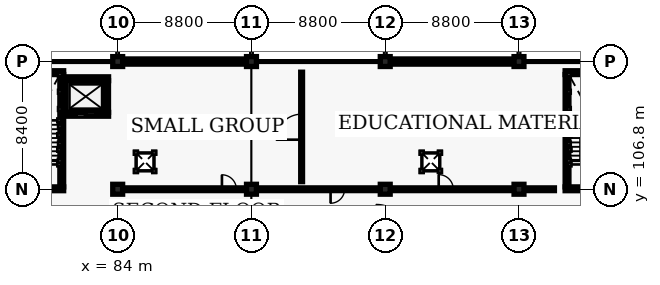
"""IFC4 building model, lengths in metres.
Left out: names, types, materials, properties, quantities, classifications, styles, units other than length and angle.
Written with IfcOpenShell. Run it as: python <this file> out.ifc"""

import sys

from ifc_helpers import new_model, si_unit, direction, frame, frame_2d, origin, origin_2d, place, context, subcontext, project, spatial, rectangle, extrude, element, fill, save


model = new_model("IFC4")
c1 = context("Model", 3, precision=1e-05, world=origin(), true_north=direction((0.0, 1.0)))
c2 = subcontext(c1, "Body", "Model", "MODEL_VIEW")
j1 = project(units=[si_unit("LENGTHUNIT", "METRE"), si_unit("PLANEANGLEUNIT", "RADIAN")], contexts=[c1])
p1 = place(None, origin())
s1 = spatial("IfcSite", under=j1, at=p1, CompositionType="ELEMENT")
p2 = place(p1, origin())
s2 = spatial("IfcBuilding", under=s1, at=p2, CompositionType="ELEMENT")
p3 = place(p2, frame((0.0, 0.0, 9.0)))
s3 = spatial("IfcBuildingStorey", under=s2, at=p3, CompositionType="ELEMENT", Elevation=9.0)
for number, where, z_axis, x_axis in (
    (1, (84.0, 106.8, 0.0), (0.0, 0.0, 1.0), (1.0, 0.0, 0.0)),
    (2, (84.0, 115.2, 0.0), (0.0, 0.0, 1.0), (1.0, 0.0, 0.0)),
    (3, (92.8, 106.8, 0.0), (0.0, 0.0, 1.0), (1.0, 0.0, 0.0)),
    (4, (92.8, 115.2, 0.0), (0.0, 0.0, 1.0), (1.0, 0.0, 0.0)),
    (5, (101.6, 106.8, 0.0), (0.0, 0.0, 1.0), (1.0, 0.0, 0.0)),
    (6, (101.6, 115.2, 0.0), (0.0, 0.0, 1.0), (1.0, 0.0, 0.0)),
    (7, (110.4, 106.8, 0.0), (0.0, 0.0, 1.0), (1.0, 0.0, 0.0)),
    (8, (110.4, 115.2, 0.0), (0.0, 0.0, 1.0), (1.0, 0.0, 0.0)),
):
    element("IfcColumn", number, at=place(p3, frame(where, z_axis=z_axis, x_axis=x_axis)), inside=s3, PredefinedType="COLUMN", context=c2, shape_type="SweptSolid", body=[
        extrude(rectangle(XDim=0.65, YDim=0.65, at=origin_2d()), origin(), (0.0, 0.0, 1.0), 3.9),
    ])
p4 = place(p3, frame((84.1, 115.2, 0.0), z_axis=(0.0, 0.0, 1.0), x_axis=(1.0, 0.0, 0.0)))
e9 = element("IfcWall", 9, at=p4, inside=s3, PredefinedType="SOLIDWALL", context=c2, shape_type="SweptSolid", body=[
    extrude(rectangle(XDim=8.6, YDim=0.34, at=frame_2d((4.3, 0.0))), origin(), (0.0, 0.0, 1.0), 2.845),
])
p5 = place(p3, frame((101.7, 115.2, 0.0), z_axis=(0.0, 0.0, 1.0), x_axis=(1.0, 0.0, 0.0)))
e10 = element("IfcWall", 10, at=p5, inside=s3, PredefinedType="SOLIDWALL", context=c2, shape_type="SweptSolid", body=[
    extrude(rectangle(XDim=8.6, YDim=0.34, at=frame_2d((4.3, 0.0))), origin(), (0.0, 0.0, 1.0), 2.845),
])
p6 = place(p3, frame((80.445, 106.83, 0.0), z_axis=(0.0, 0.0, 1.0), x_axis=(-1.0, 0.0, 0.0)))
e11 = element("IfcWall", 11, at=p6, inside=s3, PredefinedType="SHEAR", context=c2, shape_type="SweptSolid", body=[
    extrude(rectangle(XDim=3.61, YDim=0.25, at=frame_2d((1.805, 0.0))), origin(), (0.0, 0.0, 1.0), 3.66),
])
p7 = place(p6, frame((1.235, 0.0, 0.0)))
e12 = element("IfcOpeningElement", 12, at=p7, cuts=e11, PredefinedType="OPENING", context=c2, shape_type="SweptSolid", body=[
    extrude(rectangle(XDim=1.14, YDim=2.15, at=frame_2d((0.57, 1.075))), frame((0.0, 0.135, 0.0), z_axis=(0.0, -1.0, 0.0), x_axis=(1.0, 0.0, 0.0)), (0.0, 0.0, 1.0), 0.27),
])
p8 = place(p3, frame((76.835, 114.47, 0.0), z_axis=(0.0, 0.0, 1.0), x_axis=(1.0, 0.0, 0.0)))
e13 = element("IfcWall", 13, at=p8, inside=s3, PredefinedType="SHEAR", context=c2, shape_type="SweptSolid", body=[
    extrude(rectangle(XDim=3.61, YDim=0.25, at=frame_2d((1.805, 0.0))), origin(), (0.0, 0.0, 1.0), 3.66),
])
p9 = place(p3, frame((80.32, 114.345, 0.0), z_axis=(0.0, 0.0, 1.0), x_axis=(0.0, -1.0, 0.0)))
e14 = element("IfcWall", 14, at=p9, inside=s3, PredefinedType="SHEAR", context=c2, shape_type="SweptSolid", body=[
    extrude(rectangle(XDim=7.39, YDim=0.25, at=frame_2d((3.695, 0.0))), origin(), (0.0, 0.0, 1.0), 3.66),
])
p10 = place(p3, frame((80.4, 111.73, 0.0), z_axis=(0.0, 0.0, 1.0), x_axis=(1.0, 0.0, 0.0)))
e15 = element("IfcWall", 15, at=p10, inside=s3, PredefinedType="SHEAR", context=c2, shape_type="SweptSolid", body=[
    extrude(rectangle(XDim=3.0, YDim=0.25, at=frame_2d((1.5, 0.0))), origin(), (0.0, 0.0, 1.0), 3.66),
])
p11 = place(p10, frame((0.89, 0.0, 0.0)))
e16 = element("IfcOpeningElement", 16, at=p11, cuts=e15, PredefinedType="OPENING", context=c2, shape_type="SweptSolid", body=[
    extrude(rectangle(XDim=1.22, YDim=2.18, at=frame_2d((0.61, 1.09))), frame((0.0, 0.135, 0.0), z_axis=(0.0, -1.0, 0.0), x_axis=(1.0, 0.0, 0.0)), (0.0, 0.0, 1.0), 0.27),
])
p12 = place(p3, frame((83.4, 114.07, 0.0), z_axis=(0.0, 0.0, 1.0), x_axis=(-1.0, 0.0, 0.0)))
e17 = element("IfcWall", 17, at=p12, inside=s3, PredefinedType="SHEAR", context=c2, shape_type="SweptSolid", body=[
    extrude(rectangle(XDim=3.0, YDim=0.25, at=frame_2d((1.5, 0.0))), origin(), (0.0, 0.0, 1.0), 3.66),
])
p13 = place(p3, frame((83.27, 111.86, 0.0), z_axis=(0.0, 0.0, 1.0), x_axis=(0.0, 1.0, 0.0)))
e18 = element("IfcWall", 18, at=p13, inside=s3, PredefinedType="SHEAR", context=c2, shape_type="SweptSolid", body=[
    extrude(rectangle(XDim=2.08, YDim=0.25, at=frame_2d((1.04, 0.0))), origin(), (0.0, 0.0, 1.0), 3.66),
])
p14 = place(p3, frame((117.045, 106.83, 0.0), z_axis=(0.0, 0.0, 1.0), x_axis=(-1.0, 0.0, 0.0)))
e19 = element("IfcWall", 19, at=p14, inside=s3, PredefinedType="SHEAR", context=c2, shape_type="SweptSolid", body=[
    extrude(rectangle(XDim=3.61, YDim=0.25, at=frame_2d((1.805, 0.0))), origin(), (0.0, 0.0, 1.0), 3.66),
])
p15 = place(p14, frame((1.205, 0.0, 0.0)))
e20 = element("IfcOpeningElement", 20, at=p15, cuts=e19, PredefinedType="OPENING", context=c2, shape_type="SweptSolid", body=[
    extrude(rectangle(XDim=1.2, YDim=2.15, at=frame_2d((0.6, 1.075))), frame((0.0, 0.135, 0.0), z_axis=(0.0, -1.0, 0.0), x_axis=(1.0, 0.0, 0.0)), (0.0, 0.0, 1.0), 0.27),
])
p16 = place(p3, frame((113.435, 114.47, 0.0), z_axis=(0.0, 0.0, 1.0), x_axis=(1.0, 0.0, 0.0)))
e21 = element("IfcWall", 21, at=p16, inside=s3, PredefinedType="SHEAR", context=c2, shape_type="SweptSolid", body=[
    extrude(rectangle(XDim=3.61, YDim=0.25, at=frame_2d((1.805, 0.0))), origin(), (0.0, 0.0, 1.0), 3.66),
])
p17 = place(p3, frame((113.56, 106.955, 0.0), z_axis=(0.0, 0.0, 1.0), x_axis=(0.0, 1.0, 0.0)))
e22 = element("IfcWall", 22, at=p17, inside=s3, PredefinedType="SHEAR", context=c2, shape_type="SweptSolid", body=[
    extrude(rectangle(XDim=7.39, YDim=0.25, at=frame_2d((3.695, 0.0))), origin(), (0.0, 0.0, 1.0), 3.66),
])
p18 = place(p3, frame((84.2, 106.8, 0.0), z_axis=(0.0, 0.0, 1.0), x_axis=(1.0, 0.0, 0.0)))
e23 = element("IfcWall", 23, at=p18, inside=s3, PredefinedType="PARTITIONING", context=c2, shape_type="SweptSolid", body=[
    extrude(rectangle(XDim=28.53, YDim=0.18, at=frame_2d((14.265, 0.0))), origin(), (0.0, 0.0, 1.0), 2.845),
])
p19 = place(p18, frame((6.658, 0.0, 0.0)))
e24 = element("IfcOpeningElement", 24, at=p19, cuts=e23, PredefinedType="OPENING", context=c2, shape_type="SweptSolid", body=[
    extrude(rectangle(XDim=0.95, YDim=2.12, at=frame_2d((0.475, 1.06))), frame((0.0, 0.1, 0.0), z_axis=(0.0, -1.0, 0.0), x_axis=(1.0, 0.0, 0.0)), (0.0, 0.0, 1.0), 0.2),
])
p20 = place(p18, frame((13.805, 0.0, 0.0)))
e25 = element("IfcOpeningElement", 25, at=p20, cuts=e23, PredefinedType="OPENING", context=c2, shape_type="SweptSolid", body=[
    extrude(rectangle(XDim=0.92, YDim=2.1, at=frame_2d((0.46, 1.05))), frame((0.0, 0.1, 0.0), z_axis=(0.0, -1.0, 0.0), x_axis=(1.0, 0.0, 0.0)), (0.0, 0.0, 1.0), 0.2),
])
p21 = place(p18, frame((20.917, 0.0, 0.0)))
e26 = element("IfcOpeningElement", 26, at=p21, cuts=e23, PredefinedType="OPENING", context=c2, shape_type="SweptSolid", body=[
    extrude(rectangle(XDim=0.96, YDim=2.08, at=frame_2d((0.48, 1.04))), frame((0.0, 0.1, 0.0), z_axis=(0.0, -1.0, 0.0), x_axis=(1.0, 0.0, 0.0)), (0.0, 0.0, 1.0), 0.2),
])
p22 = place(p3, frame((96.1, 107.3, 0.0), z_axis=(0.0, 0.0, 1.0), x_axis=(0.0, 1.0, 0.0)))
e27 = element("IfcWall", 27, at=p22, inside=s3, PredefinedType="PARTITIONING", context=c2, shape_type="SweptSolid", body=[
    extrude(rectangle(XDim=7.2, YDim=0.12, at=frame_2d((3.6, 0.0))), origin(), (0.0, 0.0, 1.0), 3.645),
])
p23 = place(p22, frame((2.76, 0.0, 0.0)))
e28 = element("IfcOpeningElement", 28, at=p23, cuts=e27, PredefinedType="OPENING", context=c2, shape_type="SweptSolid", body=[
    extrude(rectangle(XDim=1.68, YDim=2.26, at=frame_2d((0.84, 1.13))), frame((0.0, 0.07, 0.0), z_axis=(0.0, -1.0, 0.0), x_axis=(1.0, 0.0, 0.0)), (0.0, 0.0, 1.0), 0.14),
])
p24 = place(p11, origin())
e29 = element("IfcDoor", 29, at=p24, inside=s3, OperationType="SLIDING_TO_RIGHT", PredefinedType="DOOR", context=c2, shape_type="SweptSolid", body=[
    extrude(rectangle(XDim=1.22, YDim=2.18, at=frame_2d((0.61, 1.09))), frame((0.0, 0.025, 0.0), z_axis=(0.0, -1.0, 0.0), x_axis=(1.0, 0.0, 0.0)), (0.0, 0.0, 1.0), 0.05),
])
fill(e16, e29)
p25 = place(p19, origin())
e30 = element("IfcDoor", 30, at=p25, inside=s3, OperationType="SINGLE_SWING_LEFT", PredefinedType="DOOR", context=c2, shape_type="SweptSolid", body=[
    extrude(rectangle(XDim=0.95, YDim=2.12, at=frame_2d((0.475, 1.06))), frame((0.0, 0.025, 0.0), z_axis=(0.0, -1.0, 0.0), x_axis=(1.0, 0.0, 0.0)), (0.0, 0.0, 1.0), 0.05),
])
fill(e24, e30)
p26 = place(p20, origin())
e31 = element("IfcDoor", 31, at=p26, inside=s3, OperationType="SINGLE_SWING_RIGHT", PredefinedType="DOOR", context=c2, shape_type="SweptSolid", body=[
    extrude(rectangle(XDim=0.92, YDim=2.1, at=frame_2d((0.46, 1.05))), frame((0.0, 0.025, 0.0), z_axis=(0.0, -1.0, 0.0), x_axis=(1.0, 0.0, 0.0)), (0.0, 0.0, 1.0), 0.05),
])
fill(e25, e31)
p27 = place(p21, origin())
e32 = element("IfcDoor", 32, at=p27, inside=s3, OperationType="SINGLE_SWING_LEFT", PredefinedType="DOOR", context=c2, shape_type="SweptSolid", body=[
    extrude(rectangle(XDim=0.96, YDim=2.08, at=frame_2d((0.48, 1.04))), frame((0.0, 0.025, 0.0), z_axis=(0.0, -1.0, 0.0), x_axis=(1.0, 0.0, 0.0)), (0.0, 0.0, 1.0), 0.05),
])
fill(e26, e32)
p28 = place(p23, origin())
e33 = element("IfcDoor", 33, at=p28, inside=s3, OperationType="DOUBLE_DOOR_SINGLE_SWING", PredefinedType="DOOR", context=c2, shape_type="SweptSolid", body=[
    extrude(rectangle(XDim=1.68, YDim=2.26, at=frame_2d((0.84, 1.13))), frame((0.0, 0.025, 0.0), z_axis=(0.0, -1.0, 0.0), x_axis=(1.0, 0.0, 0.0)), (0.0, 0.0, 1.0), 0.05),
])
fill(e28, e33)
save(model, sys.argv[1])
